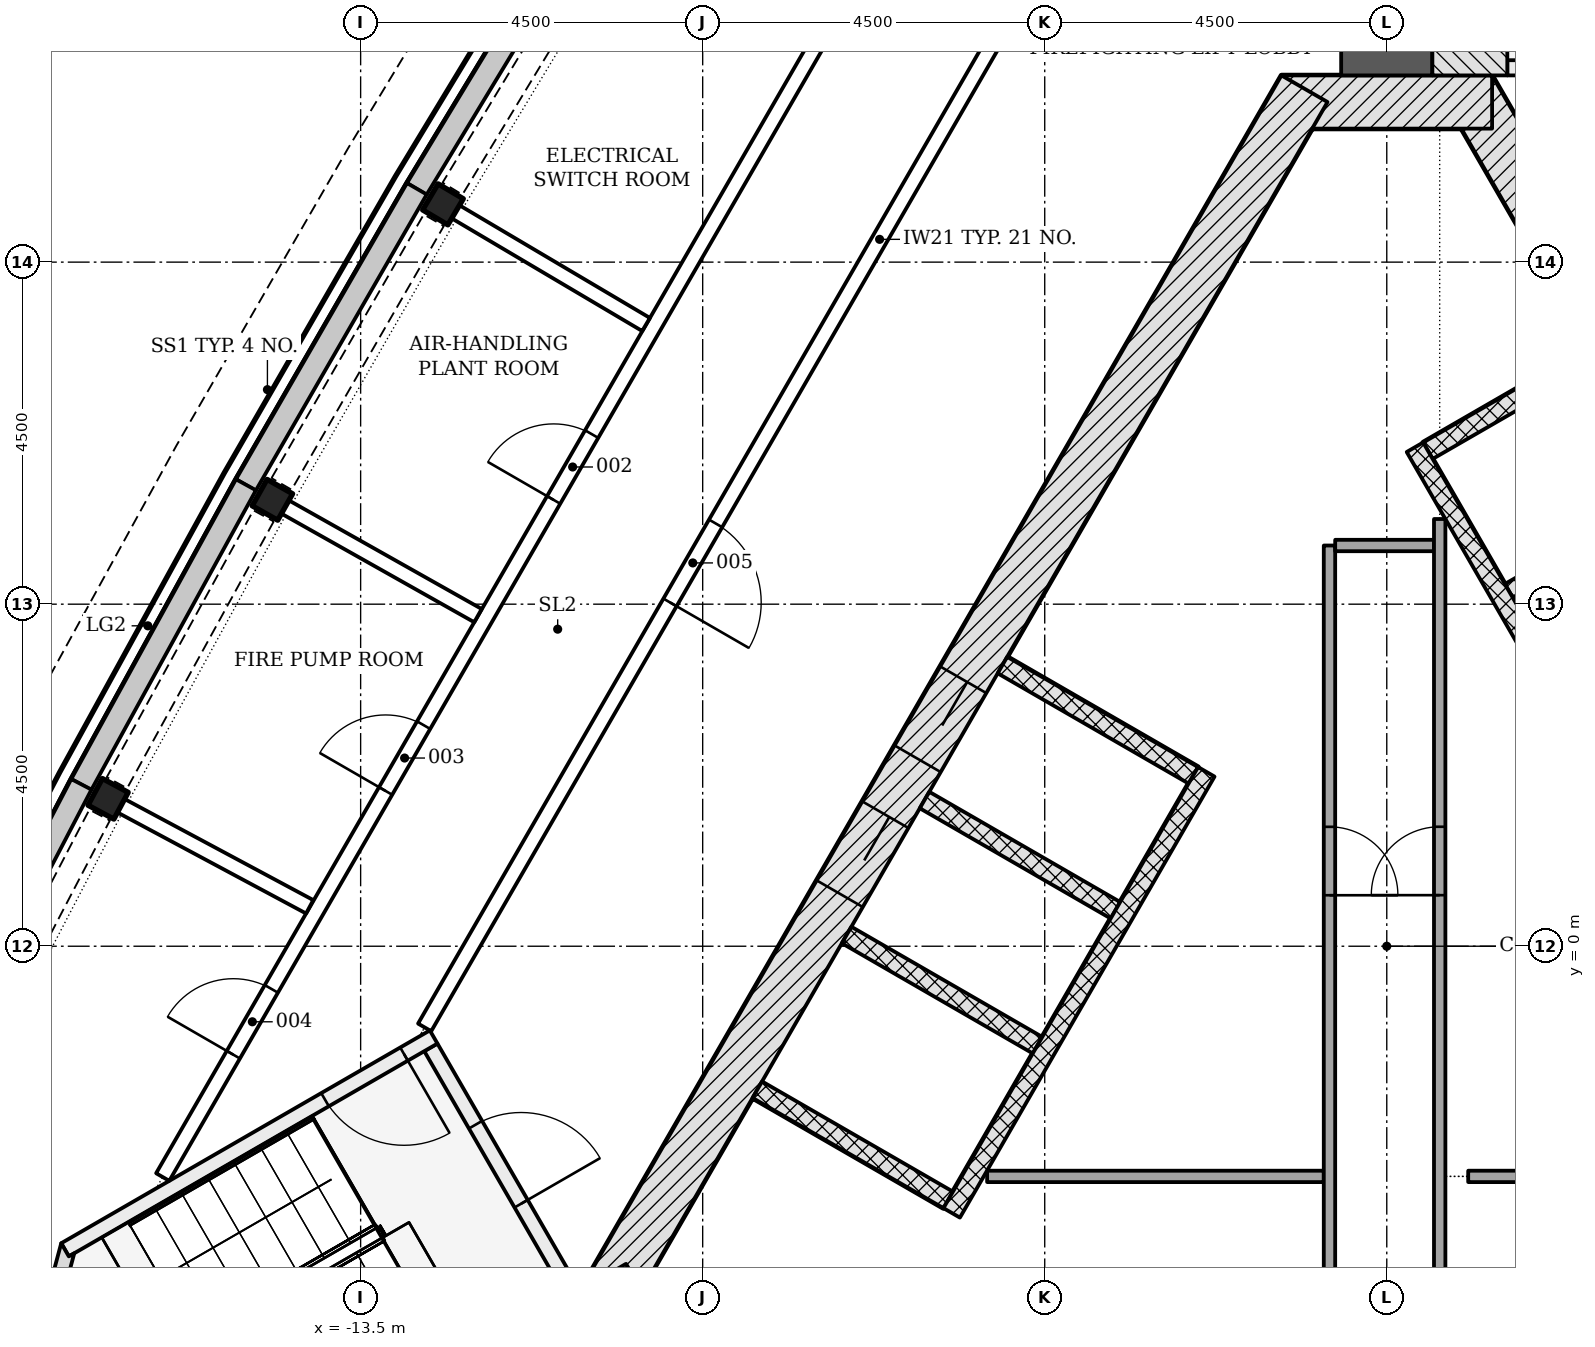
"""IFC4 building model, lengths in metres.
Left out: names, types, materials, properties, quantities, classifications, styles, units other than length and angle.
Written with IfcOpenShell. Run it as: python <this file> out.ifc"""

import sys

from ifc_helpers import new_model, si_unit, direction, frame, frame_2d, origin, origin_2d, place, context, subcontext, project, spatial, polyline, rectangle, i_section, outline, extrude, element, fill, save


model = new_model("IFC4")
c1 = context("Model", 3, precision=1e-05, world=origin(), true_north=direction((0.0, 1.0)))
c2 = subcontext(c1, "Body", "Model", "MODEL_VIEW")
j1 = project(units=[si_unit("LENGTHUNIT", "METRE"), si_unit("PLANEANGLEUNIT", "RADIAN")], contexts=[c1])
p1 = place(None, origin())
s1 = spatial("IfcSite", under=j1, at=p1, CompositionType="ELEMENT")
p2 = place(p1, origin())
s2 = spatial("IfcBuilding", under=s1, at=p2, CompositionType="ELEMENT")
p3 = place(p2, frame((0.0, 0.0, 168.9)))
s3 = spatial("IfcBuildingStorey", under=s2, at=p3, CompositionType="ELEMENT", Elevation=168.9)
p4 = place(p3, frame((10.311, -4.703, -0.3), z_axis=(0.0, 0.0, 1.0), x_axis=(-0.500001446645, 0.866024568562, 0.0)))
e1 = element("IfcWall", 1, at=p4, inside=s3, PredefinedType="SHEAR", context=c2, shape_type="SweptSolid", body=[
    extrude(rectangle(XDim=18.458, YDim=0.7, at=frame_2d((9.229, 0.0))), origin(), (0.0, 0.0, 1.0), 5.5),
])
p5 = place(p3, frame((1.386, 11.106, -0.3), z_axis=(0.0, 0.0, 1.0), x_axis=(-1.0, 0.0, 0.0)))
e2 = element("IfcWall", 2, at=p5, inside=s3, PredefinedType="SHEAR", context=c2, shape_type="SweptSolid", body=[
    extrude(rectangle(XDim=2.771, YDim=0.7, at=frame_2d((1.386, 0.0))), origin(), (0.0, 0.0, 1.0), 5.5),
])
p6 = place(p3, frame((-1.083, 11.281, -0.3), z_axis=(0.0, 0.0, 1.0), x_axis=(-0.500001446645, -0.866024568562, 0.0)))
e3 = element("IfcWall", 3, at=p6, inside=s3, PredefinedType="SHEAR", context=c2, shape_type="SweptSolid", body=[
    extrude(rectangle(XDim=18.458, YDim=0.7, at=frame_2d((9.229, 0.0))), origin(), (0.0, 0.0, 1.0), 5.5),
])
p7 = place(p6, frame((8.979, 0.0, 0.3)))
e4 = element("IfcOpeningElement", 4, at=p7, cuts=e3, PredefinedType="OPENING", context=c2, shape_type="SweptSolid", body=[
    extrude(rectangle(XDim=1.2, YDim=2.1, at=frame_2d((0.6, 1.05))), frame((0.0, 0.36, 0.0), z_axis=(0.0, -1.0, 0.0), x_axis=(1.0, 0.0, 0.0)), (0.0, 0.0, 1.0), 0.72),
])
p8 = place(p6, frame((11.029, 0.0, 0.3)))
e5 = element("IfcOpeningElement", 5, at=p8, cuts=e3, PredefinedType="OPENING", context=c2, shape_type="SweptSolid", body=[
    extrude(rectangle(XDim=1.2, YDim=2.1, at=frame_2d((0.6, 1.05))), frame((0.0, 0.36, 0.0), z_axis=(0.0, -1.0, 0.0), x_axis=(1.0, 0.0, 0.0)), (0.0, 0.0, 1.0), 0.72),
])
p9 = place(p3, frame((-10.311, -4.353, -0.3), z_axis=(0.0, 0.0, 1.0), x_axis=(0.500042739161, -0.866000726912, 0.0)))
e6 = element("IfcWall", 6, at=p9, inside=s3, PredefinedType="SHEAR", context=c2, shape_type="SweptSolid", body=[
    extrude(rectangle(XDim=2.771, YDim=0.7, at=frame_2d((1.386, 0.0))), origin(), (0.0, 0.0, 1.0), 5.5),
])
p10 = place(p3, frame((0.0, 11.456, -0.3), z_axis=(0.0, 0.0, 1.0), x_axis=(0.0, 1.0, 0.0)))
e7 = element("IfcWall", 7, at=p10, inside=s3, PredefinedType="SHEAR", context=c2, shape_type="SweptSolid", body=[
    extrude(rectangle(XDim=9.928, YDim=1.2, at=frame_2d((4.964, 0.0))), origin(), (0.0, 0.0, 1.0), 5.5),
])
for number, where, z_axis, x_axis in (
    (8, (-12.417, 9.76, -0.3), (0.0, 0.0, 1.0), (-0.509, -0.861, 0.0)),
    (9, (-14.661, 5.873, -0.3), (0.0, 0.0, 1.0), (-0.491, -0.871, 0.0)),
    (10, (-16.822, 1.939, -0.3), (0.0, 0.0, 1.0), (-0.472, -0.881, 0.0)),
):
    element("IfcColumn", number, at=place(p3, frame(where, z_axis=z_axis, x_axis=x_axis)), inside=s3, PredefinedType="COLUMN", context=c2, shape_type="SweptSolid", body=[
        extrude(i_section(OverallWidth=0.399, OverallDepth=0.386, WebThickness=0.021, FlangeThickness=0.033, FilletRadius=0.015, at=origin_2d()), origin(), (0.0, 0.0, 1.0), 5.5),
    ])
p11 = place(p3, origin())
e11 = element("IfcWall", 11, at=p11, inside=s3, PredefinedType="NOTDEFINED", context=c2, shape_type="SweptSolid", body=[
    extrude(outline(polyline([(-10.558, 13.889), (-12.89, 10.04), (-12.634, 9.885), (-10.302, 13.733), (-10.558, 13.889)])), origin(), (0.0, 0.0, 1.0), 1.2),
])
p12 = place(p3, origin())
e12 = element("IfcWall", 12, at=p12, inside=s3, PredefinedType="NOTDEFINED", context=c2, shape_type="SweptSolid", body=[
    extrude(outline(polyline([(-12.89, 10.04), (-15.14, 6.143), (-14.88, 5.993), (-12.63, 9.89), (-12.89, 10.04)])), origin(), (0.0, 0.0, 1.0), 1.2),
])
p13 = place(p3, origin())
e13 = element("IfcWall", 13, at=p13, inside=s3, PredefinedType="NOTDEFINED", context=c2, shape_type="SweptSolid", body=[
    extrude(outline(polyline([(-15.14, 6.143), (-17.307, 2.199), (-17.044, 2.055), (-14.877, 5.999), (-15.14, 6.143)])), origin(), (0.0, 0.0, 1.0), 1.2),
])
p14 = place(p3, origin())
e14 = element("IfcWall", 14, at=p14, inside=s3, PredefinedType="NOTDEFINED", context=c2, shape_type="SweptSolid", body=[
    extrude(outline(polyline([(-17.307, 2.199), (-19.39, -1.79), (-19.124, -1.928), (-17.041, 2.061), (-17.307, 2.199)])), origin(), (0.0, 0.0, 1.0), 1.2),
])
for number, where, z_axis, x_axis in (
    (15, (3.781, 5.907, -0.3), (0.0, 0.0, 1.0), (-0.866, -0.5, 0.0)),
    (16, (2.706, 7.769, -0.3), (0.0, 0.0, 1.0), (-0.866, -0.5, 0.0)),
):
    element("IfcWall", number, at=place(p3, frame(where, z_axis=z_axis, x_axis=x_axis)), inside=s3, PredefinedType="PARTITIONING", context=c2, shape_type="SweptSolid", body=[
        extrude(rectangle(XDim=2.5, YDim=0.25, at=frame_2d((1.25, 0.0))), origin(), (0.0, 0.0, 1.0), 5.5),
    ])
p15 = place(p3, frame((5.87, -2.961, 0.0), z_axis=(0.0, 0.0, 1.0), x_axis=(-0.50000615651, 0.866021849293, 0.0)))
e17 = element("IfcWall", 17, at=p15, inside=s3, PredefinedType="PARTITIONING", context=c2, shape_type="SweptSolid", body=[
    extrude(rectangle(XDim=11.0, YDim=0.25, at=frame_2d((5.5, 0.0))), origin(), (0.0, 0.0, 1.0), 5.2),
])
for number, where, z_axis, x_axis in (
    (18, (-5.056, 3.699, -0.3), (0.0, 0.0, 1.0), (0.866, -0.5, 0.0)),
    (19, (-6.081, 1.923, -0.3), (0.0, 0.0, 1.0), (0.866, -0.5, 0.0)),
    (20, (-7.106, 0.148, -0.3), (0.0, 0.0, 1.0), (0.866, -0.5, 0.0)),
    (21, (-8.281, -1.887, -0.3), (0.0, 0.0, 1.0), (0.866, -0.5, 0.0)),
):
    element("IfcWall", number, at=place(p3, frame(where, z_axis=z_axis, x_axis=x_axis)), inside=s3, PredefinedType="PARTITIONING", context=c2, shape_type="SweptSolid", body=[
        extrude(rectangle(XDim=2.9, YDim=0.25, at=frame_2d((1.45, 0.0))), origin(), (0.0, 0.0, 1.0), 5.5),
    ])
p16 = place(p3, frame((-2.374, 2.294, 0.0), z_axis=(0.0, 0.0, 1.0), x_axis=(-0.500003174267, -0.866023571113, 0.0)))
e22 = element("IfcWall", 22, at=p16, inside=s3, PredefinedType="PARTITIONING", context=c2, shape_type="SweptSolid", body=[
    extrude(rectangle(XDim=6.7, YDim=0.25, at=frame_2d((3.35, 0.0))), origin(), (0.0, 0.0, 1.0), 5.2),
])
p17 = place(p3, frame((-5.258, -3.028, 0.0), z_axis=(0.0, 0.0, 1.0), x_axis=(1.0, 0.0, 0.0)))
e23 = element("IfcWall", 23, at=p17, inside=s3, PredefinedType="PARTITIONING", context=c2, shape_type="SweptSolid", body=[
    extrude(rectangle(XDim=4.429, YDim=0.15, at=frame_2d((2.215, 0.0))), origin(), (0.0, 0.0, 1.0), 5.2),
])
p18 = place(p3, frame((-0.754, 5.272, 0.0), z_axis=(0.0, 0.0, 1.0), x_axis=(0.0, -1.0, 0.0)))
e24 = element("IfcWall", 24, at=p18, inside=s3, PredefinedType="PARTITIONING", context=c2, shape_type="SweptSolid", body=[
    extrude(rectangle(XDim=11.5, YDim=0.15, at=frame_2d((5.75, 0.0))), origin(), (0.0, 0.0, 1.0), 5.2),
])
p19 = place(p18, frame((3.701, 0.0, 0.0)))
e25 = element("IfcOpeningElement", 25, at=p19, cuts=e24, PredefinedType="OPENING", context=c2, shape_type="SweptSolid", body=[
    extrude(rectangle(XDim=0.9, YDim=2.1, at=frame_2d((0.45, 1.05))), frame((0.0, 0.085, 0.0), z_axis=(0.0, -1.0, 0.0), x_axis=(1.0, 0.0, 0.0)), (0.0, 0.0, 1.0), 0.17),
])
p20 = place(p3, frame((-0.679, 5.272, 0.0), z_axis=(0.0, 0.0, 1.0), x_axis=(1.0, 0.0, 0.0)))
e26 = element("IfcWall", 26, at=p20, inside=s3, PredefinedType="PARTITIONING", context=c2, shape_type="SweptSolid", body=[
    extrude(rectangle(XDim=1.3, YDim=0.15, at=frame_2d((0.65, 0.0))), origin(), (0.0, 0.0, 1.0), 5.2),
])
p21 = place(p3, frame((0.696, -5.928, 0.0), z_axis=(0.0, 0.0, 1.0), x_axis=(0.0, 1.0, 0.0)))
e27 = element("IfcWall", 27, at=p21, inside=s3, PredefinedType="PARTITIONING", context=c2, shape_type="SweptSolid", body=[
    extrude(rectangle(XDim=11.549, YDim=0.15, at=frame_2d((5.774, 0.0))), origin(), (0.0, 0.0, 1.0), 5.2),
])
p22 = place(p21, frame((6.6, 0.0, 0.0)))
e28 = element("IfcOpeningElement", 28, at=p22, cuts=e27, PredefinedType="OPENING", context=c2, shape_type="SweptSolid", body=[
    extrude(rectangle(XDim=0.9, YDim=2.1, at=frame_2d((0.45, 1.05))), frame((0.0, 0.085, 0.0), z_axis=(0.0, -1.0, 0.0), x_axis=(1.0, 0.0, 0.0)), (0.0, 0.0, 1.0), 0.17),
])
p23 = place(p3, frame((1.071, -3.028, 0.0), z_axis=(0.0, 0.0, 1.0), x_axis=(1.0, 0.0, 0.0)))
e29 = element("IfcWall", 29, at=p23, inside=s3, PredefinedType="PARTITIONING", context=c2, shape_type="SweptSolid", body=[
    extrude(rectangle(XDim=7.569, YDim=0.15, at=frame_2d((3.784, 0.0))), origin(), (0.0, 0.0, 1.0), 5.2),
])
p24 = place(p3, frame((5.135, 11.556, -0.3), z_axis=(0.0, 0.0, 1.0), x_axis=(-1.0, 0.0, 0.0)))
e30 = element("IfcWall", 30, at=p24, inside=s3, PredefinedType="SHEAR", context=c2, shape_type="SweptSolid", body=[
    extrude(rectangle(XDim=3.55, YDim=0.2, at=frame_2d((1.775, 0.0))), origin(), (0.0, 0.0, 1.0), 5.5),
])
p25 = place(p24, frame((1.175, 0.0, 0.3)))
e31 = element("IfcOpeningElement", 31, at=p25, cuts=e30, PredefinedType="OPENING", context=c2, shape_type="SweptSolid", body=[
    extrude(rectangle(XDim=1.2, YDim=2.1, at=frame_2d((0.6, 1.05))), frame((0.0, 0.11, 0.0), z_axis=(0.0, -1.0, 0.0), x_axis=(1.0, 0.0, 0.0)), (0.0, 0.0, 1.0), 0.22),
])
p26 = place(p3, frame((1.093, 11.456, -0.3), z_axis=(0.0, 0.0, 1.0), x_axis=(0.0, 1.0, 0.0)))
e32 = element("IfcWall", 32, at=p26, inside=s3, PredefinedType="SHEAR", context=c2, shape_type="SweptSolid", body=[
    extrude(rectangle(XDim=7.2, YDim=0.986, at=frame_2d((3.6, 0.0))), origin(), (0.0, 0.0, 1.0), 5.5),
])
p27 = place(p3, frame((-12.576, -1.331, -0.3), z_axis=(0.0, 0.0, 1.0), x_axis=(0.499970499736, -0.8660424351, 0.0)))
e33 = element("IfcWall", 33, at=p27, inside=s3, PredefinedType="SHEAR", context=c2, shape_type="SweptSolid", body=[
    extrude(rectangle(XDim=3.55, YDim=0.2, at=frame_2d((1.775, 0.0))), origin(), (0.0, 0.0, 1.0), 5.5),
])
p28 = place(p27, frame((1.175, 0.0, 0.3)))
e34 = element("IfcOpeningElement", 34, at=p28, cuts=e33, PredefinedType="OPENING", context=c2, shape_type="SweptSolid", body=[
    extrude(rectangle(XDim=1.2, YDim=2.1, at=frame_2d((0.6, 1.05))), frame((0.0, 0.11, 0.0), z_axis=(0.0, -1.0, 0.0), x_axis=(1.0, 0.0, 0.0)), (0.0, 0.0, 1.0), 0.22),
])
p29 = place(p3, frame((-12.539, -1.194, -0.3), z_axis=(0.0, 0.0, 1.0), x_axis=(-0.866045472092, -0.499965239061, 0.0)))
e35 = element("IfcWall", 35, at=p29, inside=s3, PredefinedType="SHEAR", context=c2, shape_type="SweptSolid", body=[
    extrude(rectangle(XDim=5.6, YDim=0.2, at=frame_2d((2.8, 0.0))), origin(), (0.0, 0.0, 1.0), 5.5),
])
p30 = place(p29, frame((0.45, 0.0, 0.3)))
e36 = element("IfcOpeningElement", 36, at=p30, cuts=e35, PredefinedType="OPENING", context=c2, shape_type="SweptSolid", body=[
    extrude(rectangle(XDim=1.2, YDim=2.1, at=frame_2d((0.6, 1.05))), frame((0.0, 0.11, 0.0), z_axis=(0.0, -1.0, 0.0), x_axis=(1.0, 0.0, 0.0)), (0.0, 0.0, 1.0), 0.22),
])
p31 = place(p3, frame((0.0, 0.0, -0.3)))
e37 = element("IfcWall", 37, at=p31, inside=s3, PredefinedType="SHEAR", context=c2, shape_type="SweptSolid", body=[
    extrude(outline(polyline([(-17.439, -3.907), (-18.025, -6.093), (-16.95, -7.955), (-16.777, -7.855), (-17.81, -6.065), (-17.267, -4.039), (-17.339, -4.081), (-17.339, -4.081), (-17.339, -4.081), (-17.339, -4.081), (-17.339, -4.081), (-17.339, -4.081), (-17.339, -4.081), (-17.339, -4.081), (-17.339, -4.081), (-17.339, -4.081), (-17.339, -4.081), (-17.339, -4.081), (-17.339, -4.081), (-17.339, -4.081), (-17.339, -4.081), (-17.339, -4.081), (-17.339, -4.081), (-17.439, -3.907)])), origin(), (0.0, 0.0, 1.0), 5.5),
])
p32 = place(p3, frame((-0.687, 19.667, 0.0), z_axis=(0.0, 0.0, 1.0), x_axis=(-0.500000491645, -0.866025119933, 0.0)))
e38 = element("IfcWall", 38, at=p32, inside=s3, PredefinedType="PARTITIONING", context=c2, shape_type="SweptSolid", body=[
    extrude(rectangle(XDim=23.943, YDim=0.2, at=frame_2d((11.971, 0.0))), origin(), (0.0, 0.0, 1.0), 4.647),
])
p33 = place(p32, frame((16.287, 0.0, 0.0)))
e39 = element("IfcOpeningElement", 39, at=p33, cuts=e38, PredefinedType="OPENING", context=c2, shape_type="SweptSolid", body=[
    extrude(rectangle(XDim=1.2, YDim=2.1, at=frame_2d((0.6, 1.05))), frame((0.0, 0.11, 0.0), z_axis=(0.0, -1.0, 0.0), x_axis=(1.0, 0.0, 0.0)), (0.0, 0.0, 1.0), 0.22),
])
p34 = place(p3, frame((-16.104, -3.037, 0.0), z_axis=(0.0, 0.0, 1.0), x_axis=(0.500000282061, 0.866025240936, 0.0)))
e40 = element("IfcWall", 40, at=p34, inside=s3, PredefinedType="PARTITIONING", context=c2, shape_type="SweptSolid", body=[
    extrude(rectangle(XDim=29.235, YDim=0.2, at=frame_2d((14.617, 0.0))), origin(), (0.0, 0.0, 1.0), 4.647),
])
p35 = place(p34, frame((20.65, 0.0, 0.0)))
e41 = element("IfcOpeningElement", 41, at=p35, cuts=e40, PredefinedType="OPENING", context=c2, shape_type="SweptSolid", body=[
    extrude(rectangle(XDim=1.0, YDim=2.1, at=frame_2d((0.5, 1.05))), frame((0.0, 0.11, 0.0), z_axis=(0.0, -1.0, 0.0), x_axis=(1.0, 0.0, 0.0)), (0.0, 0.0, 1.0), 0.22),
])
p36 = place(p34, frame((10.287, 0.0, 0.0)))
e42 = element("IfcOpeningElement", 42, at=p36, cuts=e40, PredefinedType="OPENING", context=c2, shape_type="SweptSolid", body=[
    extrude(rectangle(XDim=1.0, YDim=2.1, at=frame_2d((0.5, 1.05))), frame((0.0, 0.11, 0.0), z_axis=(0.0, -1.0, 0.0), x_axis=(1.0, 0.0, 0.0)), (0.0, 0.0, 1.0), 0.22),
])
p37 = place(p34, frame((5.865, 0.0, 0.0)))
e43 = element("IfcOpeningElement", 43, at=p37, cuts=e40, PredefinedType="OPENING", context=c2, shape_type="SweptSolid", body=[
    extrude(rectangle(XDim=1.0, YDim=2.1, at=frame_2d((0.5, 1.05))), frame((0.0, 0.11, 0.0), z_axis=(0.0, -1.0, 0.0), x_axis=(1.0, 0.0, 0.0)), (0.0, 0.0, 1.0), 0.22),
])
p38 = place(p34, frame((1.859, 0.0, 0.0)))
e44 = element("IfcOpeningElement", 44, at=p38, cuts=e40, PredefinedType="OPENING", context=c2, shape_type="SweptSolid", body=[
    extrude(rectangle(XDim=1.0, YDim=2.1, at=frame_2d((0.5, 1.05))), frame((0.0, 0.11, 0.0), z_axis=(0.0, -1.0, 0.0), x_axis=(1.0, 0.0, 0.0)), (0.0, 0.0, 1.0), 0.22),
])
p39 = place(p3, frame((-12.288, 9.684, 0.0), z_axis=(0.0, 0.0, 1.0), x_axis=(0.860699381133, -0.509113519088, 0.0)))
e45 = element("IfcWall", 45, at=p39, inside=s3, PredefinedType="PARTITIONING", context=c2, shape_type="SweptSolid", body=[
    extrude(rectangle(XDim=2.954, YDim=0.2, at=frame_2d((1.477, 0.0))), origin(), (0.0, 0.0, 1.0), 4.647),
])
p40 = place(p3, frame((-14.53, 5.8, 0.0), z_axis=(0.0, 0.0, 1.0), x_axis=(0.871273012139, -0.490798673916, 0.0)))
e46 = element("IfcWall", 46, at=p40, inside=s3, PredefinedType="PARTITIONING", context=c2, shape_type="SweptSolid", body=[
    extrude(rectangle(XDim=2.954, YDim=0.2, at=frame_2d((1.477, 0.0))), origin(), (0.0, 0.0, 1.0), 4.647),
])
p41 = place(p3, frame((-16.69, 1.869, 0.0), z_axis=(0.0, 0.0, 1.0), x_axis=(0.88146473232, -0.472249855136, 0.0)))
e47 = element("IfcWall", 47, at=p41, inside=s3, PredefinedType="PARTITIONING", context=c2, shape_type="SweptSolid", body=[
    extrude(rectangle(XDim=2.858, YDim=0.2, at=frame_2d((1.429, 0.0))), origin(), (0.0, 0.0, 1.0), 4.647),
])
p42 = place(p7, origin())
e48 = element("IfcDoor", 48, at=p42, inside=s3, OperationType="DOUBLE_DOOR_SLIDING", PredefinedType="DOOR", context=c2, shape_type="SweptSolid", body=[
    extrude(rectangle(XDim=1.2, YDim=2.1, at=frame_2d((0.6, 1.05))), frame((0.0, 0.025, 0.0), z_axis=(0.0, -1.0, 0.0), x_axis=(1.0, 0.0, 0.0)), (0.0, 0.0, 1.0), 0.05),
])
fill(e4, e48)
p43 = place(p8, origin())
e49 = element("IfcDoor", 49, at=p43, inside=s3, OperationType="DOUBLE_DOOR_SLIDING", PredefinedType="DOOR", context=c2, shape_type="SweptSolid", body=[
    extrude(rectangle(XDim=1.2, YDim=2.1, at=frame_2d((0.6, 1.05))), frame((0.0, 0.025, 0.0), z_axis=(0.0, -1.0, 0.0), x_axis=(1.0, 0.0, 0.0)), (0.0, 0.0, 1.0), 0.05),
])
fill(e5, e49)
p44 = place(p19, origin())
e50 = element("IfcDoor", 50, at=p44, inside=s3, OperationType="SINGLE_SWING_RIGHT", PredefinedType="DOOR", context=c2, shape_type="SweptSolid", body=[
    extrude(rectangle(XDim=0.9, YDim=2.1, at=frame_2d((0.45, 1.05))), frame((0.0, 0.025, 0.0), z_axis=(0.0, -1.0, 0.0), x_axis=(1.0, 0.0, 0.0)), (0.0, 0.0, 1.0), 0.05),
])
fill(e25, e50)
p45 = place(p22, origin())
e51 = element("IfcDoor", 51, at=p45, inside=s3, OperationType="SINGLE_SWING_LEFT", PredefinedType="DOOR", context=c2, shape_type="SweptSolid", body=[
    extrude(rectangle(XDim=0.9, YDim=2.1, at=frame_2d((0.45, 1.05))), frame((0.0, 0.025, 0.0), z_axis=(0.0, -1.0, 0.0), x_axis=(1.0, 0.0, 0.0)), (0.0, 0.0, 1.0), 0.05),
])
fill(e28, e51)
p46 = place(p28, origin())
e52 = element("IfcDoor", 52, at=p46, inside=s3, OperationType="SINGLE_SWING_RIGHT", PredefinedType="DOOR", context=c2, shape_type="SweptSolid", body=[
    extrude(rectangle(XDim=1.2, YDim=2.1, at=frame_2d((0.6, 1.05))), frame((0.0, 0.025, 0.0), z_axis=(0.0, -1.0, 0.0), x_axis=(1.0, 0.0, 0.0)), (0.0, 0.0, 1.0), 0.05),
])
fill(e34, e52)
p47 = place(p30, origin())
e53 = element("IfcDoor", 53, at=p47, inside=s3, OperationType="SINGLE_SWING_LEFT", PredefinedType="DOOR", context=c2, shape_type="SweptSolid", body=[
    extrude(rectangle(XDim=1.2, YDim=2.1, at=frame_2d((0.6, 1.05))), frame((0.0, 0.025, 0.0), z_axis=(0.0, -1.0, 0.0), x_axis=(1.0, 0.0, 0.0)), (0.0, 0.0, 1.0), 0.05),
])
fill(e36, e53)
p48 = place(p36, origin())
e54 = element("IfcDoor", 54, at=p48, inside=s3, OperationType="SINGLE_SWING_LEFT", PredefinedType="DOOR", context=c2, shape_type="SweptSolid", body=[
    extrude(rectangle(XDim=1.0, YDim=2.1, at=frame_2d((0.5, 1.05))), frame((0.0, 0.025, 0.0), z_axis=(0.0, -1.0, 0.0), x_axis=(1.0, 0.0, 0.0)), (0.0, 0.0, 1.0), 0.05),
])
fill(e42, e54)
p49 = place(p37, origin())
e55 = element("IfcDoor", 55, at=p49, inside=s3, OperationType="SINGLE_SWING_LEFT", PredefinedType="DOOR", context=c2, shape_type="SweptSolid", body=[
    extrude(rectangle(XDim=1.0, YDim=2.1, at=frame_2d((0.5, 1.05))), frame((0.0, 0.025, 0.0), z_axis=(0.0, -1.0, 0.0), x_axis=(1.0, 0.0, 0.0)), (0.0, 0.0, 1.0), 0.05),
])
fill(e43, e55)
p50 = place(p38, origin())
e56 = element("IfcDoor", 56, at=p50, inside=s3, OperationType="SINGLE_SWING_LEFT", PredefinedType="DOOR", context=c2, shape_type="SweptSolid", body=[
    extrude(rectangle(XDim=1.0, YDim=2.1, at=frame_2d((0.5, 1.05))), frame((0.0, 0.025, 0.0), z_axis=(0.0, -1.0, 0.0), x_axis=(1.0, 0.0, 0.0)), (0.0, 0.0, 1.0), 0.05),
])
fill(e44, e56)
p51 = place(p33, origin())
e57 = element("IfcDoor", 57, at=p51, inside=s3, OperationType="SINGLE_SWING_RIGHT", PredefinedType="DOOR", context=c2, shape_type="SweptSolid", body=[
    extrude(rectangle(XDim=1.2, YDim=2.1, at=frame_2d((0.6, 1.05))), frame((0.0, 0.025, 0.0), z_axis=(0.0, -1.0, 0.0), x_axis=(1.0, 0.0, 0.0)), (0.0, 0.0, 1.0), 0.05),
])
fill(e39, e57)
save(model, sys.argv[1])
